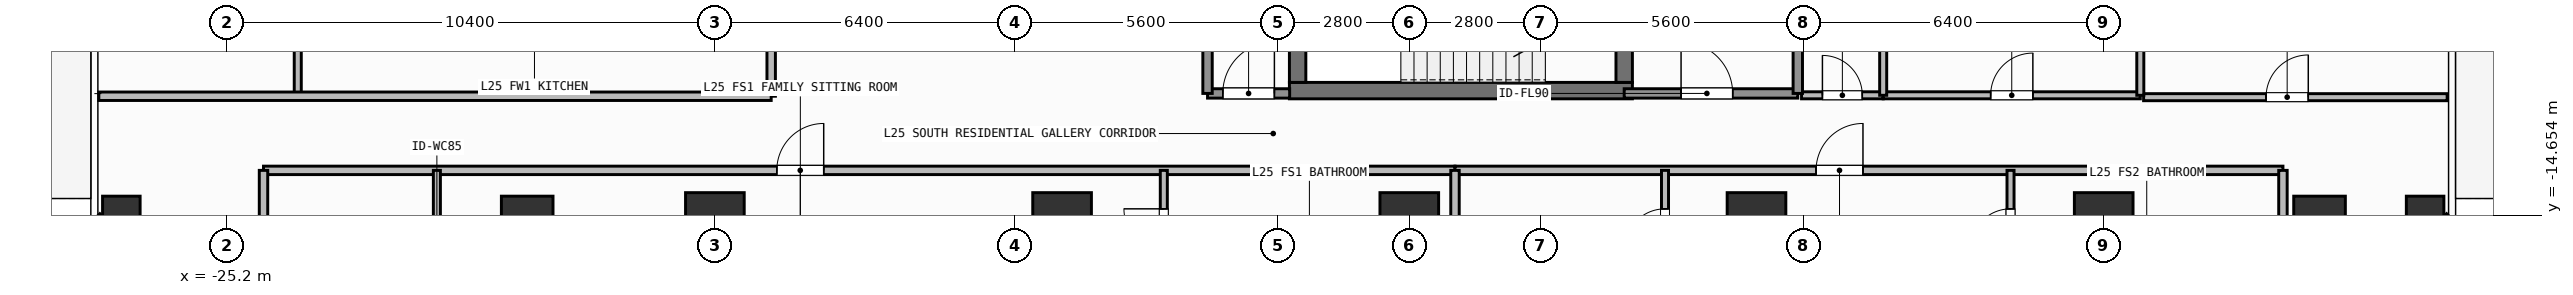
"""IFC4 building model, lengths in metres.
Left out: names, types, materials, properties, quantities, classifications, styles, units other than length and angle.
Written with IfcOpenShell. Run it as: python <this file> out.ifc"""

import sys

from ifc_helpers import new_model, si_unit, direction, frame, frame_2d, origin, origin_2d, place, context, subcontext, project, spatial, rectangle, hollow_rectangle, extrude, element, fill, save


model = new_model("IFC4")
c1 = context("Model", 3, precision=1e-05, world=origin(), true_north=direction((0.0, 1.0)))
c2 = subcontext(c1, "Body", "Model", "MODEL_VIEW")
j1 = project(units=[si_unit("LENGTHUNIT", "METRE"), si_unit("PLANEANGLEUNIT", "RADIAN")], contexts=[c1])
p1 = place(None, origin())
s1 = spatial("IfcSite", under=j1, at=p1, CompositionType="ELEMENT")
p2 = place(p1, origin())
s2 = spatial("IfcBuilding", under=s1, at=p2, CompositionType="ELEMENT")
p3 = place(p2, frame((0.0, 0.0, 100.8)))
s3 = spatial("IfcBuildingStorey", under=s2, at=p3, CompositionType="ELEMENT", Elevation=100.8)
p4 = place(p3, frame((-2.555, -12.0, 0.0), z_axis=(0.0, 0.0, 1.0), x_axis=(1.0, 0.0, 0.0)))
e1 = element("IfcWall", 1, at=p4, inside=s3, PredefinedType="SHEAR", context=c2, shape_type="SweptSolid", body=[
    extrude(rectangle(XDim=7.31, YDim=0.35, at=frame_2d((3.655, 0.0))), origin(), (0.0, 0.0, 1.0), 3.9),
])
p5 = place(p3, frame((-2.38, -11.825, 0.0), z_axis=(0.0, 0.0, 1.0), x_axis=(0.0, 1.0, 0.0)))
e2 = element("IfcWall", 2, at=p5, inside=s3, PredefinedType="SHEAR", context=c2, shape_type="SweptSolid", body=[
    extrude(rectangle(XDim=2.925, YDim=0.35, at=frame_2d((1.462, 0.0))), origin(), (0.0, 0.0, 1.0), 3.9),
])
p6 = place(p3, frame((4.58, -8.9, 0.0), z_axis=(0.0, 0.0, 1.0), x_axis=(0.0, -1.0, 0.0)))
e3 = element("IfcWall", 3, at=p6, inside=s3, PredefinedType="SHEAR", context=c2, shape_type="SweptSolid", body=[
    extrude(rectangle(XDim=2.925, YDim=0.35, at=frame_2d((1.462, 0.0))), origin(), (0.0, 0.0, 1.0), 3.9),
])
p7 = place(p6, frame((0.913, 0.0, 0.0)))
e4 = element("IfcOpeningElement", 4, at=p7, cuts=e3, PredefinedType="OPENING", context=c2, shape_type="SweptSolid", body=[
    extrude(rectangle(XDim=1.1, YDim=2.15, at=frame_2d((0.55, 1.075))), frame((0.0, 0.185, 0.0), z_axis=(0.0, -1.0, 0.0), x_axis=(1.0, 0.0, 0.0)), (0.0, 0.0, 1.0), 0.37),
])
for number, where, z_axis, x_axis in (
    (5, (-14.8, -14.8, 0.0), (0.0, 0.0, 1.0), (1.0, 0.0, 0.0)),
    (6, (-7.4, -14.8, 0.0), (0.0, 0.0, 1.0), (1.0, 0.0, 0.0)),
    (7, (0.0, -14.8, 0.0), (0.0, 0.0, 1.0), (1.0, 0.0, 0.0)),
    (8, (7.4, -14.8, 0.0), (0.0, 0.0, 1.0), (1.0, 0.0, 0.0)),
    (9, (14.8, -14.8, 0.0), (0.0, 0.0, 1.0), (1.0, 0.0, 0.0)),
):
    element("IfcColumn", number, at=place(p3, frame(where, z_axis=z_axis, x_axis=x_axis)), inside=s3, PredefinedType="COLUMN", context=c2, shape_type="SweptSolid", body=[
        extrude(rectangle(XDim=1.25, YDim=1.25, at=origin_2d()), origin(), (0.0, 0.0, 1.0), 3.9),
    ])
for number, where, z_axis, x_axis in (
    (10, (-18.8, -14.8, 0.0), (0.0, 0.0, 1.0), (1.0, 0.0, 0.0)),
    (11, (19.4, -14.8, 0.0), (0.0, 0.0, 1.0), (1.0, 0.0, 0.0)),
):
    element("IfcColumn", number, at=place(p3, frame(where, z_axis=z_axis, x_axis=x_axis)), inside=s3, PredefinedType="COLUMN", context=c2, shape_type="SweptSolid", body=[
        extrude(rectangle(XDim=1.1, YDim=1.1, at=origin_2d()), origin(), (0.0, 0.0, 1.0), 3.9),
    ])
for number, where, z_axis, x_axis in (
    (12, (-27.45, -14.65, 0.0), (0.0, 0.0, 1.0), (1.0, 0.0, 0.0)),
    (13, (21.65, -14.65, 0.0), (0.0, 0.0, 1.0), (1.0, 0.0, 0.0)),
):
    element("IfcColumn", number, at=place(p3, frame(where, z_axis=z_axis, x_axis=x_axis)), inside=s3, PredefinedType="COLUMN", context=c2, shape_type="SweptSolid", body=[
        extrude(hollow_rectangle(XDim=0.8, YDim=0.8, WallThickness=0.036, at=origin_2d()), origin(), (0.0, 0.0, 1.0), 3.9),
    ])
p8 = place(p3, frame((-23.408, -19.292, 0.0), z_axis=(0.0, 0.0, 1.0), x_axis=(-0.707087954376, 0.707125607496, 0.0)))
e14 = element("IfcWall", 14, at=p8, inside=s3, PredefinedType="SOLIDWALL", context=c2, shape_type="SweptSolid", body=[
    extrude(rectangle(XDim=6.484, YDim=0.24, at=frame_2d((3.242, 0.0))), origin(), (0.0, 0.0, 1.0), 3.68),
])
p9 = place(p8, frame((2.492, 0.0, 0.8)))
e15 = element("IfcOpeningElement", 15, at=p9, cuts=e14, PredefinedType="OPENING", context=c2, shape_type="SweptSolid", body=[
    extrude(rectangle(XDim=1.5, YDim=1.85, at=frame_2d((0.75, 0.925))), frame((0.0, 0.13, 0.0), z_axis=(0.0, -1.0, 0.0), x_axis=(1.0, 0.0, 0.0)), (0.0, 0.0, 1.0), 0.26),
])
p10 = place(p3, frame((22.192, -14.708, 0.0), z_axis=(0.0, 0.0, 1.0), x_axis=(-0.707087954376, -0.707125607496, 0.0)))
e16 = element("IfcWall", 16, at=p10, inside=s3, PredefinedType="SOLIDWALL", context=c2, shape_type="SweptSolid", body=[
    extrude(rectangle(XDim=6.484, YDim=0.24, at=frame_2d((3.242, 0.0))), origin(), (0.0, 0.0, 1.0), 3.68),
])
p11 = place(p3, frame((4.58, -12.06, 0.0), z_axis=(0.0, 0.0, 1.0), x_axis=(1.0, 0.0, 0.0)))
e17 = element("IfcWall", 17, at=p11, inside=s3, PredefinedType="SOLIDWALL", context=c2, shape_type="SweptSolid", body=[
    extrude(rectangle(XDim=3.7, YDim=0.2, at=frame_2d((1.85, 0.0))), origin(), (0.0, 0.0, 1.0), 3.68),
])
p12 = place(p11, frame((1.212, 0.0, 0.0)))
e18 = element("IfcOpeningElement", 18, at=p12, cuts=e17, PredefinedType="OPENING", context=c2, shape_type="SweptSolid", body=[
    extrude(rectangle(XDim=1.1, YDim=2.15, at=frame_2d((0.55, 1.075))), frame((0.0, 0.11, 0.0), z_axis=(0.0, -1.0, 0.0), x_axis=(1.0, 0.0, 0.0)), (0.0, 0.0, 1.0), 0.22),
])
p13 = place(p3, frame((-4.3, -12.06, 0.0), z_axis=(0.0, 0.0, 1.0), x_axis=(1.0, 0.0, 0.0)))
e19 = element("IfcWall", 19, at=p13, inside=s3, PredefinedType="SOLIDWALL", context=c2, shape_type="SweptSolid", body=[
    extrude(rectangle(XDim=1.75, YDim=0.2, at=frame_2d((0.875, 0.0))), origin(), (0.0, 0.0, 1.0), 3.68),
])
p14 = place(p13, frame((0.325, 0.0, 0.0)))
e20 = element("IfcOpeningElement", 20, at=p14, cuts=e19, PredefinedType="OPENING", context=c2, shape_type="SweptSolid", body=[
    extrude(rectangle(XDim=1.1, YDim=2.15, at=frame_2d((0.55, 1.075))), frame((0.0, 0.11, 0.0), z_axis=(0.0, -1.0, 0.0), x_axis=(1.0, 0.0, 0.0)), (0.0, 0.0, 1.0), 0.22),
])
p15 = place(p3, frame((8.36, -12.1, 0.0), z_axis=(0.0, 0.0, 1.0), x_axis=(1.0, 0.0, 0.0)))
e21 = element("IfcWall", 21, at=p15, inside=s3, PredefinedType="PARTITIONING", context=c2, shape_type="SweptSolid", body=[
    extrude(rectangle(XDim=1.74, YDim=0.15, at=frame_2d((0.87, 0.0))), origin(), (0.0, 0.0, 1.0), 3.68),
])
p16 = place(p15, frame((0.445, 0.0, 0.0)))
e22 = element("IfcOpeningElement", 22, at=p16, cuts=e21, PredefinedType="OPENING", context=c2, shape_type="SweptSolid", body=[
    extrude(rectangle(XDim=0.85, YDim=2.1, at=frame_2d((0.425, 1.05))), frame((0.0, 0.085, 0.0), z_axis=(0.0, -1.0, 0.0), x_axis=(1.0, 0.0, 0.0)), (0.0, 0.0, 1.0), 0.17),
])
p17 = place(p3, frame((10.1, -12.1, 0.0), z_axis=(0.0, 0.0, 1.0), x_axis=(1.0, 0.0, 0.0)))
e23 = element("IfcWall", 23, at=p17, inside=s3, PredefinedType="PARTITIONING", context=c2, shape_type="SweptSolid", body=[
    extrude(rectangle(XDim=5.48, YDim=0.15, at=frame_2d((2.74, 0.0))), origin(), (0.0, 0.0, 1.0), 3.68),
])
p18 = place(p17, frame((2.29, 0.0, 0.0)))
e24 = element("IfcOpeningElement", 24, at=p18, cuts=e23, PredefinedType="OPENING", context=c2, shape_type="SweptSolid", body=[
    extrude(rectangle(XDim=0.9, YDim=2.1, at=frame_2d((0.45, 1.05))), frame((0.0, 0.085, 0.0), z_axis=(0.0, -1.0, 0.0), x_axis=(1.0, 0.0, 0.0)), (0.0, 0.0, 1.0), 0.17),
])
p19 = place(p3, frame((-24.42, -13.7, 0.0), z_axis=(0.0, 0.0, 1.0), x_axis=(1.0, 0.0, 0.0)))
e25 = element("IfcWall", 25, at=p19, inside=s3, PredefinedType="PARTITIONING", context=c2, shape_type="SweptSolid", body=[
    extrude(rectangle(XDim=25.394, YDim=0.18, at=frame_2d((12.697, 0.0))), origin(), (0.0, 0.0, 1.0), 3.68),
])
p20 = place(p19, frame((10.939, 0.0, 0.0)))
e26 = element("IfcOpeningElement", 26, at=p20, cuts=e25, PredefinedType="OPENING", context=c2, shape_type="SweptSolid", body=[
    extrude(rectangle(XDim=1.0, YDim=2.2, at=frame_2d((0.5, 1.1))), frame((0.0, 0.1, 0.0), z_axis=(0.0, -1.0, 0.0), x_axis=(1.0, 0.0, 0.0)), (0.0, 0.0, 1.0), 0.2),
])
p21 = place(p3, frame((-20.725, -16.19, 0.0), z_axis=(0.0, 0.0, 1.0), x_axis=(0.0, 1.0, 0.0)))
e27 = element("IfcWall", 27, at=p21, inside=s3, PredefinedType="PARTITIONING", context=c2, shape_type="SweptSolid", body=[
    extrude(rectangle(XDim=2.49, YDim=0.15, at=frame_2d((1.245, 0.0))), origin(), (0.0, 0.0, 1.0), 3.68),
])
p22 = place(p21, frame((0.655, 0.0, 0.0)))
e28 = element("IfcOpeningElement", 28, at=p22, cuts=e27, PredefinedType="OPENING", context=c2, shape_type="SweptSolid", body=[
    extrude(rectangle(XDim=0.85, YDim=2.1, at=frame_2d((0.425, 1.05))), frame((0.0, 0.085, 0.0), z_axis=(0.0, -1.0, 0.0), x_axis=(1.0, 0.0, 0.0)), (0.0, 0.0, 1.0), 0.17),
])
p23 = place(p3, frame((-5.232, -16.19, 0.0), z_axis=(0.0, 0.0, 1.0), x_axis=(0.0, 1.0, 0.0)))
e29 = element("IfcWall", 29, at=p23, inside=s3, PredefinedType="PARTITIONING", context=c2, shape_type="SweptSolid", body=[
    extrude(rectangle(XDim=2.49, YDim=0.15, at=frame_2d((1.245, 0.0))), origin(), (0.0, 0.0, 1.0), 3.68),
])
p24 = place(p23, frame((0.82, 0.0, 0.0)))
e30 = element("IfcOpeningElement", 30, at=p24, cuts=e29, PredefinedType="OPENING", context=c2, shape_type="SweptSolid", body=[
    extrude(rectangle(XDim=0.85, YDim=2.1, at=frame_2d((0.425, 1.05))), frame((0.0, 0.085, 0.0), z_axis=(0.0, -1.0, 0.0), x_axis=(1.0, 0.0, 0.0)), (0.0, 0.0, 1.0), 0.17),
])
p25 = place(p3, frame((0.974, -13.7, 0.0), z_axis=(0.0, 0.0, 1.0), x_axis=(1.0, 0.0, 0.0)))
e31 = element("IfcWall", 31, at=p25, inside=s3, PredefinedType="PARTITIONING", context=c2, shape_type="SweptSolid", body=[
    extrude(rectangle(XDim=17.646, YDim=0.18, at=frame_2d((8.823, 0.0))), origin(), (0.0, 0.0, 1.0), 3.68),
])
p26 = place(p25, frame((7.695, 0.0, 0.0)))
e32 = element("IfcOpeningElement", 32, at=p26, cuts=e31, PredefinedType="OPENING", context=c2, shape_type="SweptSolid", body=[
    extrude(rectangle(XDim=1.0, YDim=2.2, at=frame_2d((0.5, 1.1))), frame((0.0, 0.1, 0.0), z_axis=(0.0, -1.0, 0.0), x_axis=(1.0, 0.0, 0.0)), (0.0, 0.0, 1.0), 0.2),
])
p27 = place(p3, frame((5.45, -16.19, 0.0), z_axis=(0.0, 0.0, 1.0), x_axis=(0.0, 1.0, 0.0)))
e33 = element("IfcWall", 33, at=p27, inside=s3, PredefinedType="PARTITIONING", context=c2, shape_type="SweptSolid", body=[
    extrude(rectangle(XDim=2.49, YDim=0.15, at=frame_2d((1.245, 0.0))), origin(), (0.0, 0.0, 1.0), 3.68),
])
p28 = place(p27, frame((0.82, 0.0, 0.0)))
e34 = element("IfcOpeningElement", 34, at=p28, cuts=e33, PredefinedType="OPENING", context=c2, shape_type="SweptSolid", body=[
    extrude(rectangle(XDim=0.85, YDim=2.1, at=frame_2d((0.425, 1.05))), frame((0.0, 0.085, 0.0), z_axis=(0.0, -1.0, 0.0), x_axis=(1.0, 0.0, 0.0)), (0.0, 0.0, 1.0), 0.17),
])
p29 = place(p3, frame((12.814, -16.19, 0.0), z_axis=(0.0, 0.0, 1.0), x_axis=(0.0, 1.0, 0.0)))
e35 = element("IfcWall", 35, at=p29, inside=s3, PredefinedType="PARTITIONING", context=c2, shape_type="SweptSolid", body=[
    extrude(rectangle(XDim=2.49, YDim=0.15, at=frame_2d((1.245, 0.0))), origin(), (0.0, 0.0, 1.0), 3.68),
])
p30 = place(p29, frame((0.82, 0.0, 0.0)))
e36 = element("IfcOpeningElement", 36, at=p30, cuts=e35, PredefinedType="OPENING", context=c2, shape_type="SweptSolid", body=[
    extrude(rectangle(XDim=0.85, YDim=2.1, at=frame_2d((0.425, 1.05))), frame((0.0, 0.085, 0.0), z_axis=(0.0, -1.0, 0.0), x_axis=(1.0, 0.0, 0.0)), (0.0, 0.0, 1.0), 0.17),
])
p31 = place(p3, frame((-13.6, -12.12, 0.0), z_axis=(0.0, 0.0, 1.0), x_axis=(0.0, 1.0, 0.0)))
e37 = element("IfcWall", 37, at=p31, inside=s3, PredefinedType="PARTITIONING", context=c2, shape_type="SweptSolid", body=[
    extrude(rectangle(XDim=10.52, YDim=0.18, at=frame_2d((5.26, 0.0))), origin(), (0.0, 0.0, 1.0), 3.68),
])
p32 = place(p31, frame((5.468, 0.0, 0.0)))
e38 = element("IfcOpeningElement", 38, at=p32, cuts=e37, PredefinedType="OPENING", context=c2, shape_type="SweptSolid", body=[
    extrude(rectangle(XDim=1.0, YDim=2.2, at=frame_2d((0.5, 1.1))), frame((0.0, 0.1, 0.0), z_axis=(0.0, -1.0, 0.0), x_axis=(1.0, 0.0, 0.0)), (0.0, 0.0, 1.0), 0.2),
])
p33 = place(p3, frame((15.65, -12.14, 0.0), z_axis=(0.0, 0.0, 1.0), x_axis=(1.0, 0.0, 0.0)))
e39 = element("IfcWall", 39, at=p33, inside=s3, PredefinedType="PARTITIONING", context=c2, shape_type="SweptSolid", body=[
    extrude(rectangle(XDim=6.47, YDim=0.15, at=frame_2d((3.235, 0.0))), origin(), (0.0, 0.0, 1.0), 3.68),
])
p34 = place(p33, frame((2.61, 0.0, 0.0)))
e40 = element("IfcOpeningElement", 40, at=p34, cuts=e39, PredefinedType="OPENING", context=c2, shape_type="SweptSolid", body=[
    extrude(rectangle(XDim=0.9, YDim=2.1, at=frame_2d((0.45, 1.05))), frame((0.0, 0.085, 0.0), z_axis=(0.0, -1.0, 0.0), x_axis=(1.0, 0.0, 0.0)), (0.0, 0.0, 1.0), 0.17),
])
for number, where, z_axis, x_axis in (
    (41, (8.28, -12.06, 0.0), (0.0, 0.0, 1.0), (0.0, 1.0, 0.0)),
    (42, (-4.3, -12.06, 0.0), (0.0, 0.0, 1.0), (0.0, 1.0, 0.0)),
):
    element("IfcWall", number, at=place(p3, frame(where, z_axis=z_axis, x_axis=x_axis)), inside=s3, PredefinedType="SOLIDWALL", context=c2, shape_type="SweptSolid", body=[
        extrude(rectangle(XDim=3.185, YDim=0.2, at=frame_2d((1.593, 0.0))), origin(), (0.0, 0.0, 1.0), 3.68),
    ])
p35 = place(p3, frame((10.1, -12.1, 0.0), z_axis=(0.0, 0.0, 1.0), x_axis=(0.0, 1.0, 0.0)))
e43 = element("IfcWall", 43, at=p35, inside=s3, PredefinedType="PARTITIONING", context=c2, shape_type="SweptSolid", body=[
    extrude(rectangle(XDim=2.35, YDim=0.15, at=frame_2d((1.175, 0.0))), origin(), (0.0, 0.0, 1.0), 3.68),
])
p36 = place(p3, frame((15.58, -12.1, 0.0), z_axis=(0.0, 0.0, 1.0), x_axis=(0.0, 1.0, 0.0)))
e44 = element("IfcWall", 44, at=p36, inside=s3, PredefinedType="PARTITIONING", context=c2, shape_type="SweptSolid", body=[
    extrude(rectangle(XDim=6.25, YDim=0.15, at=frame_2d((3.125, 0.0))), origin(), (0.0, 0.0, 1.0), 3.68),
])
for number, where, z_axis, x_axis in (
    (45, (-24.42, -18.11, 0.0), (0.0, 0.0, 1.0), (0.0, 1.0, 0.0)),
    (46, (18.62, -18.11, 0.0), (0.0, 0.0, 1.0), (0.0, 1.0, 0.0)),
):
    element("IfcWall", number, at=place(p3, frame(where, z_axis=z_axis, x_axis=x_axis)), inside=s3, PredefinedType="PARTITIONING", context=c2, shape_type="SweptSolid", body=[
        extrude(rectangle(XDim=4.41, YDim=0.18, at=frame_2d((2.205, 0.0))), origin(), (0.0, 0.0, 1.0), 3.68),
    ])
p37 = place(p3, frame((0.974, -19.23, 0.0), z_axis=(0.0, 0.0, 1.0), x_axis=(0.0, 1.0, 0.0)))
e47 = element("IfcWall", 47, at=p37, inside=s3, PredefinedType="PARTITIONING", context=c2, shape_type="SweptSolid", body=[
    extrude(rectangle(XDim=5.53, YDim=0.18, at=frame_2d((2.765, 0.0))), origin(), (0.0, 0.0, 1.0), 3.68),
])
p38 = place(p3, frame((-23.69, -12.12, 0.0), z_axis=(0.0, 0.0, 1.0), x_axis=(0.0, 1.0, 0.0)))
e48 = element("IfcWall", 48, at=p38, inside=s3, PredefinedType="PARTITIONING", context=c2, shape_type="SweptSolid", body=[
    extrude(rectangle(XDim=2.8, YDim=0.15, at=frame_2d((1.4, 0.0))), origin(), (0.0, 0.0, 1.0), 3.68),
])
p39 = place(p3, frame((-27.93, -12.12, 0.0), z_axis=(0.0, 0.0, 1.0), x_axis=(1.0, 0.0, 0.0)))
e49 = element("IfcWall", 49, at=p39, inside=s3, PredefinedType="PARTITIONING", context=c2, shape_type="SweptSolid", body=[
    extrude(rectangle(XDim=14.33, YDim=0.18, at=frame_2d((7.165, 0.0))), origin(), (0.0, 0.0, 1.0), 3.68),
])
p40 = place(p12, origin())
e50 = element("IfcDoor", 50, at=p40, inside=s3, OperationType="SINGLE_SWING_LEFT", PredefinedType="DOOR", context=c2, shape_type="SweptSolid", body=[
    extrude(rectangle(XDim=1.1, YDim=2.15, at=frame_2d((0.55, 1.075))), frame((0.0, 0.025, 0.0), z_axis=(0.0, -1.0, 0.0), x_axis=(1.0, 0.0, 0.0)), (0.0, 0.0, 1.0), 0.05),
])
fill(e18, e50)
p41 = place(p14, origin())
e51 = element("IfcDoor", 51, at=p41, inside=s3, OperationType="SINGLE_SWING_RIGHT", PredefinedType="DOOR", context=c2, shape_type="SweptSolid", body=[
    extrude(rectangle(XDim=1.1, YDim=2.15, at=frame_2d((0.55, 1.075))), frame((0.0, 0.025, 0.0), z_axis=(0.0, -1.0, 0.0), x_axis=(1.0, 0.0, 0.0)), (0.0, 0.0, 1.0), 0.05),
])
fill(e20, e51)
p42 = place(p16, origin())
e52 = element("IfcDoor", 52, at=p42, inside=s3, OperationType="SINGLE_SWING_LEFT", PredefinedType="DOOR", context=c2, shape_type="SweptSolid", body=[
    extrude(rectangle(XDim=0.85, YDim=2.1, at=frame_2d((0.425, 1.05))), frame((0.0, 0.025, 0.0), z_axis=(0.0, -1.0, 0.0), x_axis=(1.0, 0.0, 0.0)), (0.0, 0.0, 1.0), 0.05),
])
fill(e22, e52)
p43 = place(p18, origin())
e53 = element("IfcDoor", 53, at=p43, inside=s3, OperationType="SINGLE_SWING_RIGHT", PredefinedType="DOOR", context=c2, shape_type="SweptSolid", body=[
    extrude(rectangle(XDim=0.9, YDim=2.1, at=frame_2d((0.45, 1.05))), frame((0.0, 0.025, 0.0), z_axis=(0.0, -1.0, 0.0), x_axis=(1.0, 0.0, 0.0)), (0.0, 0.0, 1.0), 0.05),
])
fill(e24, e53)
p44 = place(p20, origin())
e54 = element("IfcDoor", 54, at=p44, inside=s3, OperationType="SINGLE_SWING_RIGHT", PredefinedType="DOOR", context=c2, shape_type="SweptSolid", body=[
    extrude(rectangle(XDim=1.0, YDim=2.2, at=frame_2d((0.5, 1.1))), frame((0.0, 0.025, 0.0), z_axis=(0.0, -1.0, 0.0), x_axis=(1.0, 0.0, 0.0)), (0.0, 0.0, 1.0), 0.05),
])
fill(e26, e54)
p45 = place(p24, origin())
e55 = element("IfcDoor", 55, at=p45, inside=s3, OperationType="SINGLE_SWING_RIGHT", PredefinedType="DOOR", context=c2, shape_type="SweptSolid", body=[
    extrude(rectangle(XDim=0.85, YDim=2.1, at=frame_2d((0.425, 1.05))), frame((0.0, 0.025, 0.0), z_axis=(0.0, -1.0, 0.0), x_axis=(1.0, 0.0, 0.0)), (0.0, 0.0, 1.0), 0.05),
])
fill(e30, e55)
p46 = place(p26, origin())
e56 = element("IfcDoor", 56, at=p46, inside=s3, OperationType="SINGLE_SWING_RIGHT", PredefinedType="DOOR", context=c2, shape_type="SweptSolid", body=[
    extrude(rectangle(XDim=1.0, YDim=2.2, at=frame_2d((0.5, 1.1))), frame((0.0, 0.025, 0.0), z_axis=(0.0, -1.0, 0.0), x_axis=(1.0, 0.0, 0.0)), (0.0, 0.0, 1.0), 0.05),
])
fill(e32, e56)
p47 = place(p28, origin())
e57 = element("IfcDoor", 57, at=p47, inside=s3, OperationType="SINGLE_SWING_LEFT", PredefinedType="DOOR", context=c2, shape_type="SweptSolid", body=[
    extrude(rectangle(XDim=0.85, YDim=2.1, at=frame_2d((0.425, 1.05))), frame((0.0, 0.025, 0.0), z_axis=(0.0, -1.0, 0.0), x_axis=(1.0, 0.0, 0.0)), (0.0, 0.0, 1.0), 0.05),
])
fill(e34, e57)
p48 = place(p30, origin())
e58 = element("IfcDoor", 58, at=p48, inside=s3, OperationType="SINGLE_SWING_LEFT", PredefinedType="DOOR", context=c2, shape_type="SweptSolid", body=[
    extrude(rectangle(XDim=0.85, YDim=2.1, at=frame_2d((0.425, 1.05))), frame((0.0, 0.025, 0.0), z_axis=(0.0, -1.0, 0.0), x_axis=(1.0, 0.0, 0.0)), (0.0, 0.0, 1.0), 0.05),
])
fill(e36, e58)
p49 = place(p34, origin())
e59 = element("IfcDoor", 59, at=p49, inside=s3, OperationType="SINGLE_SWING_RIGHT", PredefinedType="DOOR", context=c2, shape_type="SweptSolid", body=[
    extrude(rectangle(XDim=0.9, YDim=2.1, at=frame_2d((0.45, 1.05))), frame((0.0, 0.025, 0.0), z_axis=(0.0, -1.0, 0.0), x_axis=(1.0, 0.0, 0.0)), (0.0, 0.0, 1.0), 0.05),
])
fill(e40, e59)
save(model, sys.argv[1])
